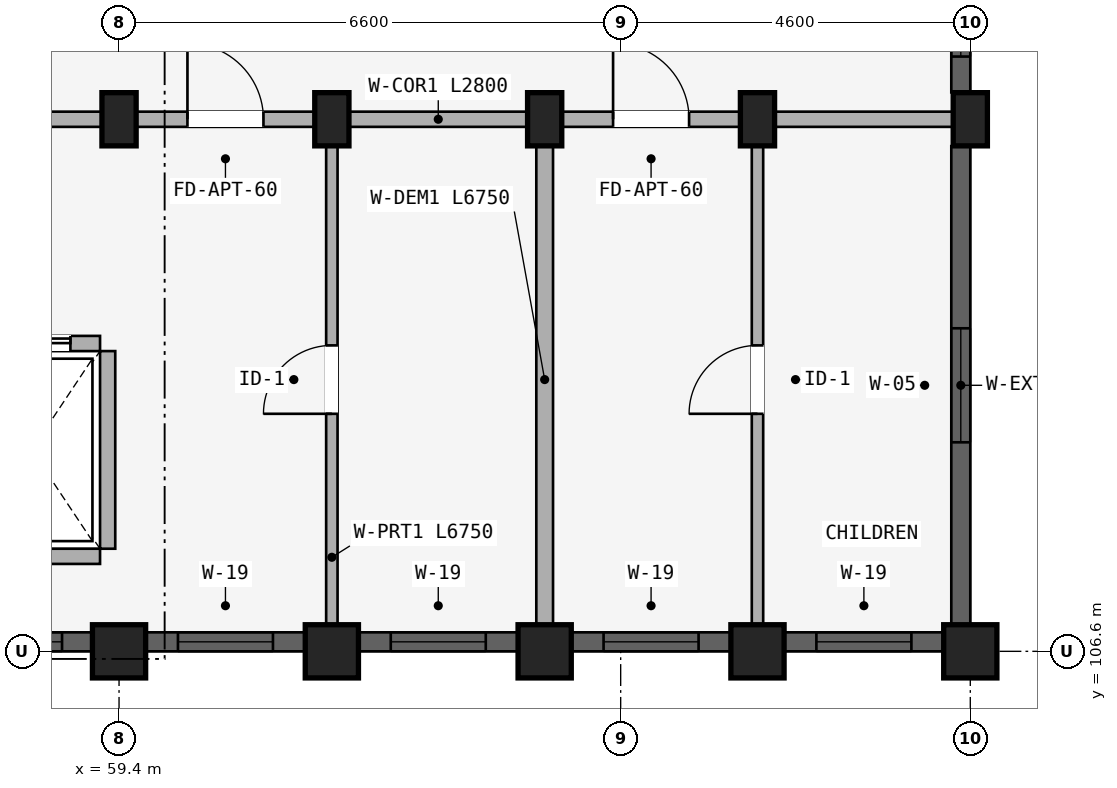
"""IFC4 building model, lengths in metres.
Left out: names, types, materials, properties, quantities, classifications, styles, units other than length and angle.
Written with IfcOpenShell. Run it as: python <this file> out.ifc"""

import sys

from ifc_helpers import new_model, si_unit, direction, frame, frame_2d, origin, origin_2d, place, context, subcontext, project, spatial, rectangle, extrude, element, fill, save


model = new_model("IFC4")
c1 = context("Model", 3, precision=1e-05, world=origin(), true_north=direction((0.0, 1.0)))
c2 = subcontext(c1, "Body", "Model", "MODEL_VIEW")
j1 = project(units=[si_unit("LENGTHUNIT", "METRE"), si_unit("PLANEANGLEUNIT", "RADIAN")], contexts=[c1])
p1 = place(None, origin())
s1 = spatial("IfcSite", under=j1, at=p1, CompositionType="ELEMENT")
p2 = place(p1, origin())
s2 = spatial("IfcBuilding", under=s1, at=p2, CompositionType="ELEMENT")
p3 = place(p2, frame((0.0, 0.0, 24.45)))
s3 = spatial("IfcBuildingStorey", under=s2, at=p3, CompositionType="ELEMENT", Elevation=24.45)
p4 = place(p3, frame((59.4, 106.6, 0.0), z_axis=(0.0, 0.0, 1.0), x_axis=(1.0, 0.0, 0.0)))
e1 = element("IfcColumn", 1, at=p4, inside=s3, PredefinedType="COLUMN", context=c2, shape_type="SweptSolid", body=[
    extrude(rectangle(XDim=0.7, YDim=0.7, at=origin_2d()), origin(), (0.0, 0.0, 1.0), 2.93),
])
p5 = place(p3, frame((59.4, 113.6, 0.0), z_axis=(0.0, 0.0, 1.0), x_axis=(1.0, 0.0, 0.0)))
e2 = element("IfcColumn", 2, at=p5, inside=s3, PredefinedType="COLUMN", context=c2, shape_type="SweptSolid", body=[
    extrude(rectangle(XDim=0.45, YDim=0.7, at=origin_2d()), origin(), (0.0, 0.0, 1.0), 2.93),
])
p6 = place(p3, frame((62.2, 106.6, 0.0), z_axis=(0.0, 0.0, 1.0), x_axis=(1.0, 0.0, 0.0)))
e3 = element("IfcColumn", 3, at=p6, inside=s3, PredefinedType="COLUMN", context=c2, shape_type="SweptSolid", body=[
    extrude(rectangle(XDim=0.7, YDim=0.7, at=origin_2d()), origin(), (0.0, 0.0, 1.0), 2.93),
])
p7 = place(p3, frame((62.2, 113.6, 0.0), z_axis=(0.0, 0.0, 1.0), x_axis=(1.0, 0.0, 0.0)))
e4 = element("IfcColumn", 4, at=p7, inside=s3, PredefinedType="COLUMN", context=c2, shape_type="SweptSolid", body=[
    extrude(rectangle(XDim=0.45, YDim=0.7, at=origin_2d()), origin(), (0.0, 0.0, 1.0), 2.93),
])
p8 = place(p3, frame((65.0, 106.6, 0.0), z_axis=(0.0, 0.0, 1.0), x_axis=(1.0, 0.0, 0.0)))
e5 = element("IfcColumn", 5, at=p8, inside=s3, PredefinedType="COLUMN", context=c2, shape_type="SweptSolid", body=[
    extrude(rectangle(XDim=0.7, YDim=0.7, at=origin_2d()), origin(), (0.0, 0.0, 1.0), 2.93),
])
p9 = place(p3, frame((65.0, 113.6, 0.0), z_axis=(0.0, 0.0, 1.0), x_axis=(1.0, 0.0, 0.0)))
e6 = element("IfcColumn", 6, at=p9, inside=s3, PredefinedType="COLUMN", context=c2, shape_type="SweptSolid", body=[
    extrude(rectangle(XDim=0.45, YDim=0.7, at=origin_2d()), origin(), (0.0, 0.0, 1.0), 2.93),
])
p10 = place(p3, frame((67.8, 106.6, 0.0), z_axis=(0.0, 0.0, 1.0), x_axis=(1.0, 0.0, 0.0)))
e7 = element("IfcColumn", 7, at=p10, inside=s3, PredefinedType="COLUMN", context=c2, shape_type="SweptSolid", body=[
    extrude(rectangle(XDim=0.7, YDim=0.7, at=origin_2d()), origin(), (0.0, 0.0, 1.0), 2.93),
])
p11 = place(p3, frame((67.8, 113.6, 0.0), z_axis=(0.0, 0.0, 1.0), x_axis=(1.0, 0.0, 0.0)))
e8 = element("IfcColumn", 8, at=p11, inside=s3, PredefinedType="COLUMN", context=c2, shape_type="SweptSolid", body=[
    extrude(rectangle(XDim=0.45, YDim=0.7, at=origin_2d()), origin(), (0.0, 0.0, 1.0), 2.93),
])
p12 = place(p3, frame((70.6, 106.6, 0.0), z_axis=(0.0, 0.0, 1.0), x_axis=(1.0, 0.0, 0.0)))
e9 = element("IfcColumn", 9, at=p12, inside=s3, PredefinedType="COLUMN", context=c2, shape_type="SweptSolid", body=[
    extrude(rectangle(XDim=0.7, YDim=0.7, at=origin_2d()), origin(), (0.0, 0.0, 1.0), 2.93),
])
p13 = place(p3, frame((70.6, 113.6, 0.0), z_axis=(0.0, 0.0, 1.0), x_axis=(1.0, 0.0, 0.0)))
e10 = element("IfcColumn", 10, at=p13, inside=s3, PredefinedType="COLUMN", context=c2, shape_type="SweptSolid", body=[
    extrude(rectangle(XDim=0.45, YDim=0.7, at=origin_2d()), origin(), (0.0, 0.0, 1.0), 2.93),
])
p14 = place(p3, frame((59.25, 107.95, 0.0), z_axis=(0.0, 0.0, 1.0), x_axis=(0.0, 1.0, 0.0)))
e11 = element("IfcWall", 11, at=p14, inside=s3, PredefinedType="STANDARD", context=c2, shape_type="SweptSolid", body=[
    extrude(rectangle(XDim=2.6, YDim=0.2, at=frame_2d((1.3, 0.0))), origin(), (0.0, 0.0, 1.0), 2.372),
])
p15 = place(p3, frame((57.35, 107.85, 0.0), z_axis=(0.0, 0.0, 1.0), x_axis=(1.0, 0.0, 0.0)))
e12 = element("IfcWall", 12, at=p15, inside=s3, PredefinedType="STANDARD", context=c2, shape_type="SweptSolid", body=[
    extrude(rectangle(XDim=1.8, YDim=0.2, at=frame_2d((0.9, 0.0))), origin(), (0.0, 0.0, 1.0), 2.93),
])
p16 = place(p3, frame((57.35, 110.65, 0.0), z_axis=(0.0, 0.0, 1.0), x_axis=(1.0, 0.0, 0.0)))
e13 = element("IfcWall", 13, at=p16, inside=s3, PredefinedType="STANDARD", context=c2, shape_type="SweptSolid", body=[
    extrude(rectangle(XDim=1.8, YDim=0.2, at=frame_2d((0.9, 0.0))), origin(), (0.0, 0.0, 1.0), 2.93),
])
p17 = place(p16, frame((0.39, 0.0, 0.0)))
e14 = element("IfcOpeningElement", 14, at=p17, cuts=e13, PredefinedType="OPENING", context=c2, shape_type="SweptSolid", body=[
    extrude(rectangle(XDim=1.02, YDim=2.15, at=frame_2d((0.51, 1.075))), frame((0.0, 0.11, 0.0), z_axis=(0.0, -1.0, 0.0), x_axis=(1.0, 0.0, 0.0)), (0.0, 0.0, 1.0), 0.22),
])
p18 = place(p3, frame((53.75, 113.6, 0.0), z_axis=(0.0, 0.0, 1.0), x_axis=(1.0, 0.0, 0.0)))
e15 = element("IfcWall", 15, at=p18, inside=s3, PredefinedType="STANDARD", context=c2, shape_type="SweptSolid", body=[
    extrude(rectangle(XDim=5.6, YDim=0.2, at=frame_2d((2.8, 0.0))), origin(), (0.0, 0.0, 1.0), 2.372),
])
p19 = place(p18, frame((1.91, 0.0, 0.0)))
e16 = element("IfcOpeningElement", 16, at=p19, cuts=e15, PredefinedType="OPENING", context=c2, shape_type="SweptSolid", body=[
    extrude(rectangle(XDim=1.22, YDim=2.15, at=frame_2d((0.61, 1.075))), frame((0.0, 0.11, 0.0), z_axis=(0.0, -1.0, 0.0), x_axis=(1.0, 0.0, 0.0)), (0.0, 0.0, 1.0), 0.22),
])
p20 = place(p3, frame((59.4, 113.6, 0.0), z_axis=(0.0, 0.0, 1.0), x_axis=(1.0, 0.0, 0.0)))
e17 = element("IfcWall", 17, at=p20, inside=s3, PredefinedType="STANDARD", context=c2, shape_type="SweptSolid", body=[
    extrude(rectangle(XDim=2.8, YDim=0.2, at=frame_2d((1.4, 0.0))), origin(), (0.0, 0.0, 1.0), 2.372),
])
p21 = place(p20, frame((0.9, 0.0, 0.0)))
e18 = element("IfcOpeningElement", 18, at=p21, cuts=e17, PredefinedType="OPENING", context=c2, shape_type="SweptSolid", body=[
    extrude(rectangle(XDim=1.0, YDim=2.15, at=frame_2d((0.5, 1.075))), frame((0.0, 0.11, 0.0), z_axis=(0.0, -1.0, 0.0), x_axis=(1.0, 0.0, 0.0)), (0.0, 0.0, 1.0), 0.22),
])
p22 = place(p3, frame((62.2, 113.6, 0.0), z_axis=(0.0, 0.0, 1.0), x_axis=(1.0, 0.0, 0.0)))
e19 = element("IfcWall", 19, at=p22, inside=s3, PredefinedType="STANDARD", context=c2, shape_type="SweptSolid", body=[
    extrude(rectangle(XDim=2.8, YDim=0.2, at=frame_2d((1.4, 0.0))), origin(), (0.0, 0.0, 1.0), 2.372),
])
p23 = place(p3, frame((65.0, 113.6, 0.0), z_axis=(0.0, 0.0, 1.0), x_axis=(1.0, 0.0, 0.0)))
e20 = element("IfcWall", 20, at=p23, inside=s3, PredefinedType="STANDARD", context=c2, shape_type="SweptSolid", body=[
    extrude(rectangle(XDim=2.8, YDim=0.2, at=frame_2d((1.4, 0.0))), origin(), (0.0, 0.0, 1.0), 2.372),
])
p24 = place(p23, frame((0.9, 0.0, 0.0)))
e21 = element("IfcOpeningElement", 21, at=p24, cuts=e20, PredefinedType="OPENING", context=c2, shape_type="SweptSolid", body=[
    extrude(rectangle(XDim=1.0, YDim=2.15, at=frame_2d((0.5, 1.075))), frame((0.0, 0.11, 0.0), z_axis=(0.0, -1.0, 0.0), x_axis=(1.0, 0.0, 0.0)), (0.0, 0.0, 1.0), 0.22),
])
p25 = place(p3, frame((67.8, 113.6, 0.0), z_axis=(0.0, 0.0, 1.0), x_axis=(1.0, 0.0, 0.0)))
e22 = element("IfcWall", 22, at=p25, inside=s3, PredefinedType="STANDARD", context=c2, shape_type="SweptSolid", body=[
    extrude(rectangle(XDim=2.8, YDim=0.2, at=frame_2d((1.4, 0.0))), origin(), (0.0, 0.0, 1.0), 2.372),
])
p26 = place(p3, frame((62.2, 106.8, 0.0), z_axis=(0.0, 0.0, 1.0), x_axis=(0.0, 1.0, 0.0)))
e23 = element("IfcWall", 23, at=p26, inside=s3, PredefinedType="PARTITIONING", context=c2, shape_type="SweptSolid", body=[
    extrude(rectangle(XDim=6.75, YDim=0.15, at=frame_2d((3.375, 0.0))), origin(), (0.0, 0.0, 1.0), 2.372),
])
p27 = place(p26, frame((2.925, 0.0, 0.0)))
e24 = element("IfcOpeningElement", 24, at=p27, cuts=e23, PredefinedType="OPENING", context=c2, shape_type="SweptSolid", body=[
    extrude(rectangle(XDim=0.9, YDim=2.1, at=frame_2d((0.45, 1.05))), frame((0.0, 0.085, 0.0), z_axis=(0.0, -1.0, 0.0), x_axis=(1.0, 0.0, 0.0)), (0.0, 0.0, 1.0), 0.17),
])
p28 = place(p3, frame((65.0, 106.8, 0.0), z_axis=(0.0, 0.0, 1.0), x_axis=(0.0, 1.0, 0.0)))
e25 = element("IfcWall", 25, at=p28, inside=s3, PredefinedType="STANDARD", context=c2, shape_type="SweptSolid", body=[
    extrude(rectangle(XDim=6.75, YDim=0.22, at=frame_2d((3.375, 0.0))), origin(), (0.0, 0.0, 1.0), 2.372),
])
p29 = place(p3, frame((67.8, 106.8, 0.0), z_axis=(0.0, 0.0, 1.0), x_axis=(0.0, 1.0, 0.0)))
e26 = element("IfcWall", 26, at=p29, inside=s3, PredefinedType="PARTITIONING", context=c2, shape_type="SweptSolid", body=[
    extrude(rectangle(XDim=6.75, YDim=0.15, at=frame_2d((3.375, 0.0))), origin(), (0.0, 0.0, 1.0), 2.372),
])
p30 = place(p29, frame((2.925, 0.0, 0.0)))
e27 = element("IfcOpeningElement", 27, at=p30, cuts=e26, PredefinedType="OPENING", context=c2, shape_type="SweptSolid", body=[
    extrude(rectangle(XDim=0.9, YDim=2.1, at=frame_2d((0.45, 1.05))), frame((0.0, 0.085, 0.0), z_axis=(0.0, -1.0, 0.0), x_axis=(1.0, 0.0, 0.0)), (0.0, 0.0, 1.0), 0.17),
])
p31 = place(p3, frame((56.628, 106.725, 0.0), z_axis=(0.0, 0.0, 1.0), x_axis=(1.0, 0.0, 0.0)))
e28 = element("IfcWall", 28, at=p31, inside=s3, PredefinedType="STANDARD", context=c2, shape_type="SweptSolid", body=[
    extrude(rectangle(XDim=2.422, YDim=0.25, at=frame_2d((1.211, 0.0))), origin(), (0.0, 0.0, 1.0), 2.472),
])
p32 = place(p31, frame((0.822, 0.0, 0.772)))
e29 = element("IfcOpeningElement", 29, at=p32, cuts=e28, PredefinedType="OPENING", context=c2, shape_type="SweptSolid", body=[
    extrude(rectangle(XDim=1.2, YDim=1.5, at=frame_2d((0.6, 0.75))), frame((0.0, 0.135, 0.0), z_axis=(0.0, -1.0, 0.0), x_axis=(1.0, 0.0, 0.0)), (0.0, 0.0, 1.0), 0.27),
])
p33 = place(p3, frame((59.753, 106.725, 0.0), z_axis=(0.0, 0.0, 1.0), x_axis=(1.0, 0.0, 0.0)))
e30 = element("IfcWall", 30, at=p33, inside=s3, PredefinedType="STANDARD", context=c2, shape_type="SweptSolid", body=[
    extrude(rectangle(XDim=2.093, YDim=0.25, at=frame_2d((1.046, 0.0))), origin(), (0.0, 0.0, 1.0), 2.472),
])
p34 = place(p33, frame((0.421, 0.0, 0.722)))
e31 = element("IfcOpeningElement", 31, at=p34, cuts=e30, PredefinedType="OPENING", context=c2, shape_type="SweptSolid", body=[
    extrude(rectangle(XDim=1.25, YDim=1.55, at=frame_2d((0.625, 0.775))), frame((0.0, 0.135, 0.0), z_axis=(0.0, -1.0, 0.0), x_axis=(1.0, 0.0, 0.0)), (0.0, 0.0, 1.0), 0.27),
])
p35 = place(p3, frame((62.553, 106.725, 0.0), z_axis=(0.0, 0.0, 1.0), x_axis=(1.0, 0.0, 0.0)))
e32 = element("IfcWall", 32, at=p35, inside=s3, PredefinedType="STANDARD", context=c2, shape_type="SweptSolid", body=[
    extrude(rectangle(XDim=2.093, YDim=0.25, at=frame_2d((1.046, 0.0))), origin(), (0.0, 0.0, 1.0), 2.472),
])
p36 = place(p35, frame((0.421, 0.0, 0.722)))
e33 = element("IfcOpeningElement", 33, at=p36, cuts=e32, PredefinedType="OPENING", context=c2, shape_type="SweptSolid", body=[
    extrude(rectangle(XDim=1.25, YDim=1.55, at=frame_2d((0.625, 0.775))), frame((0.0, 0.135, 0.0), z_axis=(0.0, -1.0, 0.0), x_axis=(1.0, 0.0, 0.0)), (0.0, 0.0, 1.0), 0.27),
])
p37 = place(p3, frame((65.354, 106.725, 0.0), z_axis=(0.0, 0.0, 1.0), x_axis=(1.0, 0.0, 0.0)))
e34 = element("IfcWall", 34, at=p37, inside=s3, PredefinedType="STANDARD", context=c2, shape_type="SweptSolid", body=[
    extrude(rectangle(XDim=2.093, YDim=0.25, at=frame_2d((1.046, 0.0))), origin(), (0.0, 0.0, 1.0), 2.472),
])
p38 = place(p37, frame((0.421, 0.0, 0.722)))
e35 = element("IfcOpeningElement", 35, at=p38, cuts=e34, PredefinedType="OPENING", context=c2, shape_type="SweptSolid", body=[
    extrude(rectangle(XDim=1.25, YDim=1.55, at=frame_2d((0.625, 0.775))), frame((0.0, 0.135, 0.0), z_axis=(0.0, -1.0, 0.0), x_axis=(1.0, 0.0, 0.0)), (0.0, 0.0, 1.0), 0.27),
])
p39 = place(p3, frame((68.154, 106.725, 0.0), z_axis=(0.0, 0.0, 1.0), x_axis=(1.0, 0.0, 0.0)))
e36 = element("IfcWall", 36, at=p39, inside=s3, PredefinedType="STANDARD", context=c2, shape_type="SweptSolid", body=[
    extrude(rectangle(XDim=2.093, YDim=0.25, at=frame_2d((1.046, 0.0))), origin(), (0.0, 0.0, 1.0), 2.472),
])
p40 = place(p39, frame((0.421, 0.0, 0.722)))
e37 = element("IfcOpeningElement", 37, at=p40, cuts=e36, PredefinedType="OPENING", context=c2, shape_type="SweptSolid", body=[
    extrude(rectangle(XDim=1.25, YDim=1.55, at=frame_2d((0.625, 0.775))), frame((0.0, 0.135, 0.0), z_axis=(0.0, -1.0, 0.0), x_axis=(1.0, 0.0, 0.0)), (0.0, 0.0, 1.0), 0.27),
])
p41 = place(p3, frame((70.475, 106.954, 0.0), z_axis=(0.0, 0.0, 1.0), x_axis=(0.0, 1.0, 0.0)))
e38 = element("IfcWall", 38, at=p41, inside=s3, PredefinedType="STANDARD", context=c2, shape_type="SweptSolid", body=[
    extrude(rectangle(XDim=6.293, YDim=0.25, at=frame_2d((3.146, 0.0))), origin(), (0.0, 0.0, 1.0), 2.372),
])
p42 = place(p41, frame((2.396, 0.0, 0.522)))
e39 = element("IfcOpeningElement", 39, at=p42, cuts=e38, PredefinedType="OPENING", context=c2, shape_type="SweptSolid", body=[
    extrude(rectangle(XDim=1.5, YDim=1.65, at=frame_2d((0.75, 0.825))), frame((0.0, 0.135, 0.0), z_axis=(0.0, -1.0, 0.0), x_axis=(1.0, 0.0, 0.0)), (0.0, 0.0, 1.0), 0.27),
])
p43 = place(p3, frame((70.475, 113.954, 0.0), z_axis=(0.0, 0.0, 1.0), x_axis=(0.0, 1.0, 0.0)))
e40 = element("IfcWall", 40, at=p43, inside=s3, PredefinedType="STANDARD", context=c2, shape_type="SweptSolid", body=[
    extrude(rectangle(XDim=1.693, YDim=0.25, at=frame_2d((0.846, 0.0))), origin(), (0.0, 0.0, 1.0), 2.372),
])
p44 = place(p43, frame((0.471, 0.0, 0.88)))
e41 = element("IfcOpeningElement", 41, at=p44, cuts=e40, PredefinedType="OPENING", context=c2, shape_type="SweptSolid", body=[
    extrude(rectangle(XDim=0.75, YDim=1.05, at=frame_2d((0.375, 0.525))), frame((0.0, 0.135, 0.0), z_axis=(0.0, -1.0, 0.0), x_axis=(1.0, 0.0, 0.0)), (0.0, 0.0, 1.0), 0.27),
])
p45 = place(p32, origin())
e42 = element("IfcWindow", 42, at=p45, inside=s3, PartitioningType="SINGLE_PANEL", PredefinedType="WINDOW", context=c2, shape_type="SweptSolid", body=[
    extrude(rectangle(XDim=1.2, YDim=1.5, at=frame_2d((0.6, 0.75))), frame((0.0, 0.03, 0.0), z_axis=(0.0, -1.0, 0.0), x_axis=(1.0, 0.0, 0.0)), (0.0, 0.0, 1.0), 0.06),
])
fill(e29, e42)
p46 = place(p34, origin())
e43 = element("IfcWindow", 43, at=p46, inside=s3, PartitioningType="SINGLE_PANEL", PredefinedType="WINDOW", context=c2, shape_type="SweptSolid", body=[
    extrude(rectangle(XDim=1.25, YDim=1.55, at=frame_2d((0.625, 0.775))), frame((0.0, 0.03, 0.0), z_axis=(0.0, -1.0, 0.0), x_axis=(1.0, 0.0, 0.0)), (0.0, 0.0, 1.0), 0.06),
])
fill(e31, e43)
p47 = place(p36, origin())
e44 = element("IfcWindow", 44, at=p47, inside=s3, PartitioningType="SINGLE_PANEL", PredefinedType="WINDOW", context=c2, shape_type="SweptSolid", body=[
    extrude(rectangle(XDim=1.25, YDim=1.55, at=frame_2d((0.625, 0.775))), frame((0.0, 0.03, 0.0), z_axis=(0.0, -1.0, 0.0), x_axis=(1.0, 0.0, 0.0)), (0.0, 0.0, 1.0), 0.06),
])
fill(e33, e44)
p48 = place(p38, origin())
e45 = element("IfcWindow", 45, at=p48, inside=s3, PartitioningType="SINGLE_PANEL", PredefinedType="WINDOW", context=c2, shape_type="SweptSolid", body=[
    extrude(rectangle(XDim=1.25, YDim=1.55, at=frame_2d((0.625, 0.775))), frame((0.0, 0.03, 0.0), z_axis=(0.0, -1.0, 0.0), x_axis=(1.0, 0.0, 0.0)), (0.0, 0.0, 1.0), 0.06),
])
fill(e35, e45)
p49 = place(p40, origin())
e46 = element("IfcWindow", 46, at=p49, inside=s3, PartitioningType="SINGLE_PANEL", PredefinedType="WINDOW", context=c2, shape_type="SweptSolid", body=[
    extrude(rectangle(XDim=1.25, YDim=1.55, at=frame_2d((0.625, 0.775))), frame((0.0, 0.03, 0.0), z_axis=(0.0, -1.0, 0.0), x_axis=(1.0, 0.0, 0.0)), (0.0, 0.0, 1.0), 0.06),
])
fill(e37, e46)
p50 = place(p42, origin())
e47 = element("IfcWindow", 47, at=p50, inside=s3, PartitioningType="DOUBLE_PANEL_VERTICAL", PredefinedType="WINDOW", context=c2, shape_type="SweptSolid", body=[
    extrude(rectangle(XDim=1.5, YDim=1.65, at=frame_2d((0.75, 0.825))), frame((0.0, 0.03, 0.0), z_axis=(0.0, -1.0, 0.0), x_axis=(1.0, 0.0, 0.0)), (0.0, 0.0, 1.0), 0.06),
])
fill(e39, e47)
p51 = place(p44, origin())
e48 = element("IfcWindow", 48, at=p51, inside=s3, PartitioningType="SINGLE_PANEL", PredefinedType="WINDOW", context=c2, shape_type="SweptSolid", body=[
    extrude(rectangle(XDim=0.75, YDim=1.05, at=frame_2d((0.375, 0.525))), frame((0.0, 0.03, 0.0), z_axis=(0.0, -1.0, 0.0), x_axis=(1.0, 0.0, 0.0)), (0.0, 0.0, 1.0), 0.06),
])
fill(e41, e48)
p52 = place(p17, origin())
e49 = element("IfcDoor", 49, at=p52, inside=s3, OperationType="SLIDING_TO_RIGHT", PredefinedType="DOOR", context=c2, shape_type="SweptSolid", body=[
    extrude(rectangle(XDim=1.02, YDim=2.15, at=frame_2d((0.51, 1.075))), frame((0.0, 0.025, 0.0), z_axis=(0.0, -1.0, 0.0), x_axis=(1.0, 0.0, 0.0)), (0.0, 0.0, 1.0), 0.05),
])
fill(e14, e49)
p53 = place(p21, origin())
e50 = element("IfcDoor", 50, at=p53, inside=s3, OperationType="SINGLE_SWING_LEFT", PredefinedType="DOOR", context=c2, shape_type="SweptSolid", body=[
    extrude(rectangle(XDim=1.0, YDim=2.15, at=frame_2d((0.5, 1.075))), frame((0.0, 0.025, 0.0), z_axis=(0.0, -1.0, 0.0), x_axis=(1.0, 0.0, 0.0)), (0.0, 0.0, 1.0), 0.05),
])
fill(e18, e50)
p54 = place(p24, origin())
e51 = element("IfcDoor", 51, at=p54, inside=s3, OperationType="SINGLE_SWING_LEFT", PredefinedType="DOOR", context=c2, shape_type="SweptSolid", body=[
    extrude(rectangle(XDim=1.0, YDim=2.15, at=frame_2d((0.5, 1.075))), frame((0.0, 0.025, 0.0), z_axis=(0.0, -1.0, 0.0), x_axis=(1.0, 0.0, 0.0)), (0.0, 0.0, 1.0), 0.05),
])
fill(e21, e51)
p55 = place(p27, frame((0.9, 0.0, 0.0), z_axis=(0.0, 0.0, 1.0), x_axis=(-1.0, 0.0, 0.0)))
e52 = element("IfcDoor", 52, at=p55, inside=s3, OperationType="SINGLE_SWING_RIGHT", PredefinedType="DOOR", context=c2, shape_type="SweptSolid", body=[
    extrude(rectangle(XDim=0.9, YDim=2.1, at=frame_2d((0.45, 1.05))), frame((0.0, 0.025, 0.0), z_axis=(0.0, -1.0, 0.0), x_axis=(1.0, 0.0, 0.0)), (0.0, 0.0, 1.0), 0.05),
])
fill(e24, e52)
p56 = place(p30, origin())
e53 = element("IfcDoor", 53, at=p56, inside=s3, OperationType="SINGLE_SWING_LEFT", PredefinedType="DOOR", context=c2, shape_type="SweptSolid", body=[
    extrude(rectangle(XDim=0.9, YDim=2.1, at=frame_2d((0.45, 1.05))), frame((0.0, 0.025, 0.0), z_axis=(0.0, -1.0, 0.0), x_axis=(1.0, 0.0, 0.0)), (0.0, 0.0, 1.0), 0.05),
])
fill(e27, e53)
save(model, sys.argv[1])
